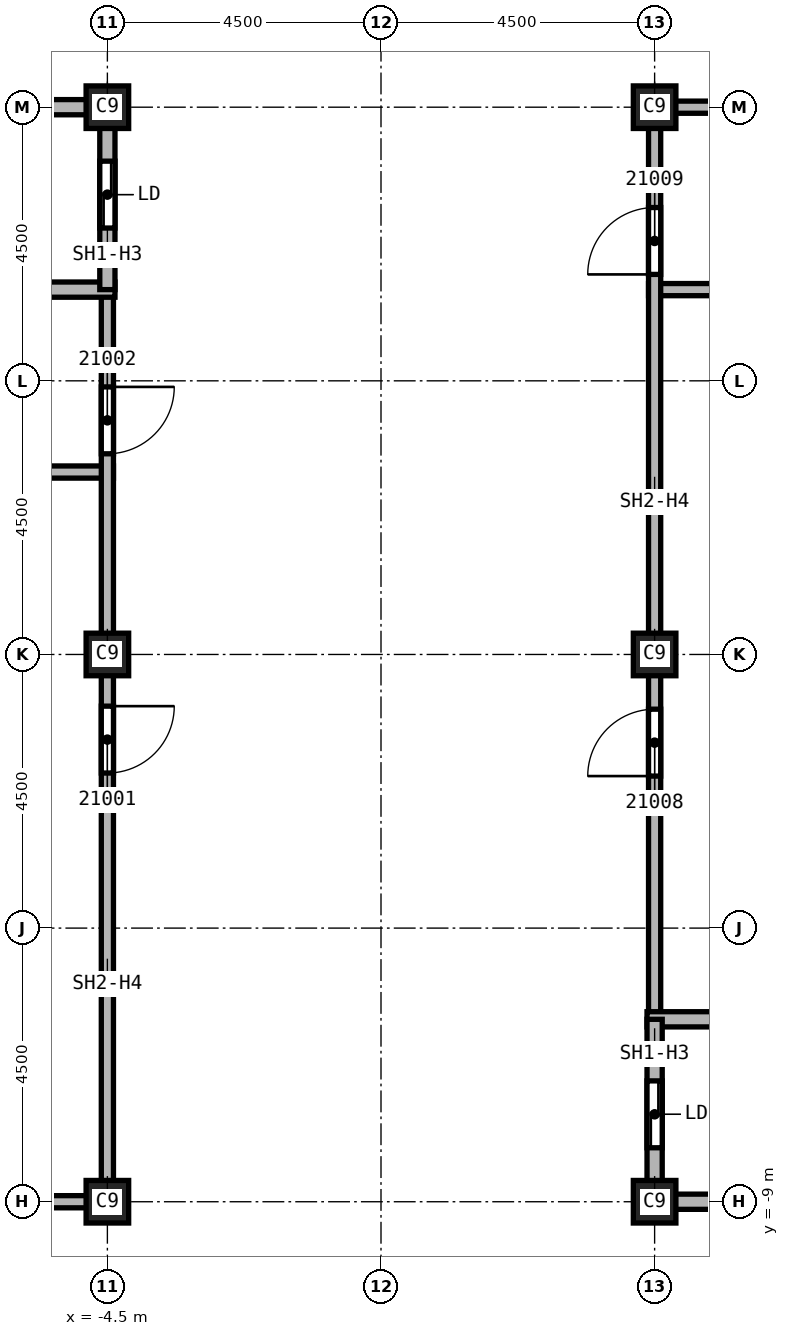
"""IFC4 building model, lengths in metres.
Left out: names, types, materials, properties, quantities, classifications, styles, units other than length and angle.
Written with IfcOpenShell. Run it as: python <this file> out.ifc"""

import sys

from ifc_helpers import new_model, si_unit, direction, frame, frame_2d, origin, origin_2d, place, context, subcontext, project, spatial, rectangle, extrude, element, fill, save


model = new_model("IFC4")
c1 = context("Model", 3, precision=1e-05, world=origin(), true_north=direction((0.0, 1.0)))
c2 = subcontext(c1, "Body", "Model", "MODEL_VIEW")
j1 = project(units=[si_unit("LENGTHUNIT", "METRE"), si_unit("PLANEANGLEUNIT", "RADIAN")], contexts=[c1])
p1 = place(None, origin())
s1 = spatial("IfcSite", under=j1, at=p1, CompositionType="ELEMENT")
p2 = place(p1, origin())
s2 = spatial("IfcBuilding", under=s1, at=p2, CompositionType="ELEMENT")
p3 = place(p2, frame((0.0, 0.0, 300.0)))
s3 = spatial("IfcBuildingStorey", under=s2, at=p3, CompositionType="ELEMENT", Elevation=300.0)
for number, where, z_axis, x_axis in (
    (1, (4.5, 0.0, 0.0), (0.0, 0.0, 1.0), (1.0, 0.0, 0.0)),
    (2, (4.5, 9.0, 0.0), (0.0, 0.0, 1.0), (1.0, 0.0, 0.0)),
    (3, (4.5, -9.0, 0.0), (0.0, 0.0, 1.0), (1.0, 0.0, 0.0)),
    (4, (-4.5, 0.0, 0.0), (0.0, 0.0, 1.0), (1.0, 0.0, 0.0)),
    (5, (-4.5, 9.0, 0.0), (0.0, 0.0, 1.0), (1.0, 0.0, 0.0)),
    (6, (-4.5, -9.0, 0.0), (0.0, 0.0, 1.0), (1.0, 0.0, 0.0)),
):
    element("IfcColumn", number, at=place(p3, frame(where, z_axis=z_axis, x_axis=x_axis)), inside=s3, PredefinedType="COLUMN", context=c2, shape_type="SweptSolid", body=[
        extrude(rectangle(XDim=0.7, YDim=0.7, at=origin_2d()), origin(), (0.0, 0.0, 1.0), 3.74),
    ])
p4 = place(p3, frame((-7.625, 3.0, 0.0), z_axis=(0.0, 0.0, 1.0), x_axis=(1.0, 0.0, 0.0)))
e7 = element("IfcWall", 7, at=p4, inside=s3, PredefinedType="SOLIDWALL", context=c2, shape_type="SweptSolid", body=[
    extrude(rectangle(XDim=3.225, YDim=0.2, at=frame_2d((1.613, 0.0))), origin(), (0.0, 0.0, 1.0), 3.74),
])
p5 = place(p3, frame((-4.5, -9.0, 0.0), z_axis=(0.0, 0.0, 1.0), x_axis=(-1.0, 0.0, 0.0)))
e8 = element("IfcWall", 8, at=p5, inside=s3, PredefinedType="SOLIDWALL", context=c2, shape_type="SweptSolid", body=[
    extrude(rectangle(XDim=3.0, YDim=0.2, at=frame_2d((1.5, 0.0))), origin(), (0.0, 0.0, 1.0), 3.062),
])
p6 = place(p3, frame((-4.5, 6.0, 0.0), z_axis=(0.0, 0.0, 1.0), x_axis=(0.0, -1.0, 0.0)))
e9 = element("IfcWall", 9, at=p6, inside=s3, PredefinedType="SOLIDWALL", context=c2, shape_type="SweptSolid", body=[
    extrude(rectangle(XDim=15.1, YDim=0.2, at=frame_2d((7.55, 0.0))), origin(), (0.0, 0.0, 1.0), 3.062),
])
p7 = place(p6, frame((6.85, 0.0, 0.0)))
e10 = element("IfcOpeningElement", 10, at=p7, cuts=e9, PredefinedType="OPENING", context=c2, shape_type="SweptSolid", body=[
    extrude(rectangle(XDim=1.1, YDim=2.1, at=frame_2d((0.55, 1.05))), frame((0.0, 0.1, 0.0), z_axis=(0.0, -1.0, 0.0), x_axis=(1.0, 0.0, 0.0)), (0.0, 0.0, 1.0), 0.2),
])
p8 = place(p6, frame((1.6, 0.0, 0.0)))
e11 = element("IfcOpeningElement", 11, at=p8, cuts=e9, PredefinedType="OPENING", context=c2, shape_type="SweptSolid", body=[
    extrude(rectangle(XDim=1.1, YDim=2.1, at=frame_2d((0.55, 1.05))), frame((0.0, 0.1, 0.0), z_axis=(0.0, -1.0, 0.0), x_axis=(1.0, 0.0, 0.0)), (0.0, 0.0, 1.0), 0.2),
])
p9 = place(p3, frame((4.4, 6.0, 0.0), z_axis=(0.0, 0.0, 1.0), x_axis=(1.0, 0.0, 0.0)))
e12 = element("IfcWall", 12, at=p9, inside=s3, PredefinedType="SOLIDWALL", context=c2, shape_type="SweptSolid", body=[
    extrude(rectangle(XDim=3.2, YDim=0.2, at=frame_2d((1.6, 0.0))), origin(), (0.0, 0.0, 1.0), 3.74),
])
p10 = place(p3, frame((4.5, -6.0, 0.0), z_axis=(0.0, 0.0, 1.0), x_axis=(0.0, 1.0, 0.0)))
e13 = element("IfcWall", 13, at=p10, inside=s3, PredefinedType="SOLIDWALL", context=c2, shape_type="SweptSolid", body=[
    extrude(rectangle(XDim=15.1, YDim=0.2, at=frame_2d((7.55, 0.0))), origin(), (0.0, 0.0, 1.0), 3.062),
])
p11 = place(p10, frame((4.0, 0.0, 0.0)))
e14 = element("IfcOpeningElement", 14, at=p11, cuts=e13, PredefinedType="OPENING", context=c2, shape_type="SweptSolid", body=[
    extrude(rectangle(XDim=1.1, YDim=2.1, at=frame_2d((0.55, 1.05))), frame((0.0, 0.1, 0.0), z_axis=(0.0, -1.0, 0.0), x_axis=(1.0, 0.0, 0.0)), (0.0, 0.0, 1.0), 0.2),
])
p12 = place(p10, frame((12.25, 0.0, 0.0)))
e15 = element("IfcOpeningElement", 15, at=p12, cuts=e13, PredefinedType="OPENING", context=c2, shape_type="SweptSolid", body=[
    extrude(rectangle(XDim=1.1, YDim=2.1, at=frame_2d((0.55, 1.05))), frame((0.0, 0.1, 0.0), z_axis=(0.0, -1.0, 0.0), x_axis=(1.0, 0.0, 0.0)), (0.0, 0.0, 1.0), 0.2),
])
p13 = place(p3, frame((4.5, 9.0, 0.0), z_axis=(0.0, 0.0, 1.0), x_axis=(1.0, 0.0, 0.0)))
e16 = element("IfcWall", 16, at=p13, inside=s3, PredefinedType="SOLIDWALL", context=c2, shape_type="SweptSolid", body=[
    extrude(rectangle(XDim=3.0, YDim=0.2, at=frame_2d((1.5, 0.0))), origin(), (0.0, 0.0, 1.0), 3.062),
])
p14 = place(p3, frame((-7.625, 6.0, 0.0), z_axis=(0.0, 0.0, 1.0), x_axis=(1.0, 0.0, 0.0)))
e17 = element("IfcWall", 17, at=p14, inside=s3, PredefinedType="SOLIDWALL", context=c2, shape_type="SweptSolid", body=[
    extrude(rectangle(XDim=3.25, YDim=0.25, at=frame_2d((1.625, 0.0))), origin(), (0.0, 0.0, 1.0), 3.74),
])
p15 = place(p3, frame((-7.5, 9.0, 0.0), z_axis=(0.0, 0.0, 1.0), x_axis=(1.0, 0.0, 0.0)))
e18 = element("IfcWall", 18, at=p15, inside=s3, PredefinedType="SOLIDWALL", context=c2, shape_type="SweptSolid", body=[
    extrude(rectangle(XDim=3.0, YDim=0.25, at=frame_2d((1.5, 0.0))), origin(), (0.0, 0.0, 1.0), 3.062),
])
p16 = place(p3, frame((-4.5, 9.125, 0.0), z_axis=(0.0, 0.0, 1.0), x_axis=(0.0, -1.0, 0.0)))
e19 = element("IfcWall", 19, at=p16, inside=s3, PredefinedType="SOLIDWALL", context=c2, shape_type="SweptSolid", body=[
    extrude(rectangle(XDim=3.125, YDim=0.25, at=frame_2d((1.562, 0.0))), origin(), (0.0, 0.0, 1.0), 3.062),
])
p17 = place(p16, frame((1.012, 0.0, 0.0)))
e20 = element("IfcOpeningElement", 20, at=p17, cuts=e19, PredefinedType="OPENING", context=c2, shape_type="SweptSolid", body=[
    extrude(rectangle(XDim=1.1, YDim=2.1, at=frame_2d((0.55, 1.05))), frame((0.0, 0.125, 0.0), z_axis=(0.0, -1.0, 0.0), x_axis=(1.0, 0.0, 0.0)), (0.0, 0.0, 1.0), 0.25),
])
p18 = place(p3, frame((4.375, -6.0, 0.0), z_axis=(0.0, 0.0, 1.0), x_axis=(1.0, 0.0, 0.0)))
e21 = element("IfcWall", 21, at=p18, inside=s3, PredefinedType="SOLIDWALL", context=c2, shape_type="SweptSolid", body=[
    extrude(rectangle(XDim=3.25, YDim=0.25, at=frame_2d((1.625, 0.0))), origin(), (0.0, 0.0, 1.0), 3.74),
])
p19 = place(p3, frame((4.5, -9.125, 0.0), z_axis=(0.0, 0.0, 1.0), x_axis=(0.0, 1.0, 0.0)))
e22 = element("IfcWall", 22, at=p19, inside=s3, PredefinedType="SOLIDWALL", context=c2, shape_type="SweptSolid", body=[
    extrude(rectangle(XDim=3.125, YDim=0.25, at=frame_2d((1.562, 0.0))), origin(), (0.0, 0.0, 1.0), 3.062),
])
p20 = place(p19, frame((1.012, 0.0, 0.0)))
e23 = element("IfcOpeningElement", 23, at=p20, cuts=e22, PredefinedType="OPENING", context=c2, shape_type="SweptSolid", body=[
    extrude(rectangle(XDim=1.1, YDim=2.1, at=frame_2d((0.55, 1.05))), frame((0.0, 0.125, 0.0), z_axis=(0.0, -1.0, 0.0), x_axis=(1.0, 0.0, 0.0)), (0.0, 0.0, 1.0), 0.25),
])
p21 = place(p3, frame((7.5, -9.0, 0.0), z_axis=(0.0, 0.0, 1.0), x_axis=(-1.0, 0.0, 0.0)))
e24 = element("IfcWall", 24, at=p21, inside=s3, PredefinedType="SOLIDWALL", context=c2, shape_type="SweptSolid", body=[
    extrude(rectangle(XDim=3.0, YDim=0.25, at=frame_2d((1.5, 0.0))), origin(), (0.0, 0.0, 1.0), 3.062),
])
p22 = place(p7, origin())
e25 = element("IfcDoor", 25, at=p22, inside=s3, OperationType="SINGLE_SWING_RIGHT", PredefinedType="DOOR", context=c2, shape_type="SweptSolid", body=[
    extrude(rectangle(XDim=1.1, YDim=2.1, at=frame_2d((0.55, 1.05))), frame((0.0, 0.025, 0.0), z_axis=(0.0, -1.0, 0.0), x_axis=(1.0, 0.0, 0.0)), (0.0, 0.0, 1.0), 0.05),
])
fill(e10, e25)
p23 = place(p8, origin())
e26 = element("IfcDoor", 26, at=p23, inside=s3, OperationType="SINGLE_SWING_LEFT", PredefinedType="DOOR", context=c2, shape_type="SweptSolid", body=[
    extrude(rectangle(XDim=1.1, YDim=2.1, at=frame_2d((0.55, 1.05))), frame((0.0, 0.025, 0.0), z_axis=(0.0, -1.0, 0.0), x_axis=(1.0, 0.0, 0.0)), (0.0, 0.0, 1.0), 0.05),
])
fill(e11, e26)
p24 = place(p11, origin())
e27 = element("IfcDoor", 27, at=p24, inside=s3, OperationType="SINGLE_SWING_LEFT", PredefinedType="DOOR", context=c2, shape_type="SweptSolid", body=[
    extrude(rectangle(XDim=1.1, YDim=2.1, at=frame_2d((0.55, 1.05))), frame((0.0, 0.025, 0.0), z_axis=(0.0, -1.0, 0.0), x_axis=(1.0, 0.0, 0.0)), (0.0, 0.0, 1.0), 0.05),
])
fill(e14, e27)
p25 = place(p12, origin())
e28 = element("IfcDoor", 28, at=p25, inside=s3, OperationType="SINGLE_SWING_RIGHT", PredefinedType="DOOR", context=c2, shape_type="SweptSolid", body=[
    extrude(rectangle(XDim=1.1, YDim=2.1, at=frame_2d((0.55, 1.05))), frame((0.0, 0.025, 0.0), z_axis=(0.0, -1.0, 0.0), x_axis=(1.0, 0.0, 0.0)), (0.0, 0.0, 1.0), 0.05),
])
fill(e15, e28)
p26 = place(p17, origin())
e29 = element("IfcDoor", 29, at=p26, inside=s3, OperationType="SLIDING_TO_LEFT", PredefinedType="DOOR", context=c2, shape_type="SweptSolid", body=[
    extrude(rectangle(XDim=1.1, YDim=2.1, at=frame_2d((0.55, 1.05))), frame((0.0, 0.025, 0.0), z_axis=(0.0, -1.0, 0.0), x_axis=(1.0, 0.0, 0.0)), (0.0, 0.0, 1.0), 0.05),
])
fill(e20, e29)
p27 = place(p20, origin())
e30 = element("IfcDoor", 30, at=p27, inside=s3, OperationType="SLIDING_TO_LEFT", PredefinedType="DOOR", context=c2, shape_type="SweptSolid", body=[
    extrude(rectangle(XDim=1.1, YDim=2.1, at=frame_2d((0.55, 1.05))), frame((0.0, 0.025, 0.0), z_axis=(0.0, -1.0, 0.0), x_axis=(1.0, 0.0, 0.0)), (0.0, 0.0, 1.0), 0.05),
])
fill(e23, e30)
save(model, sys.argv[1])
